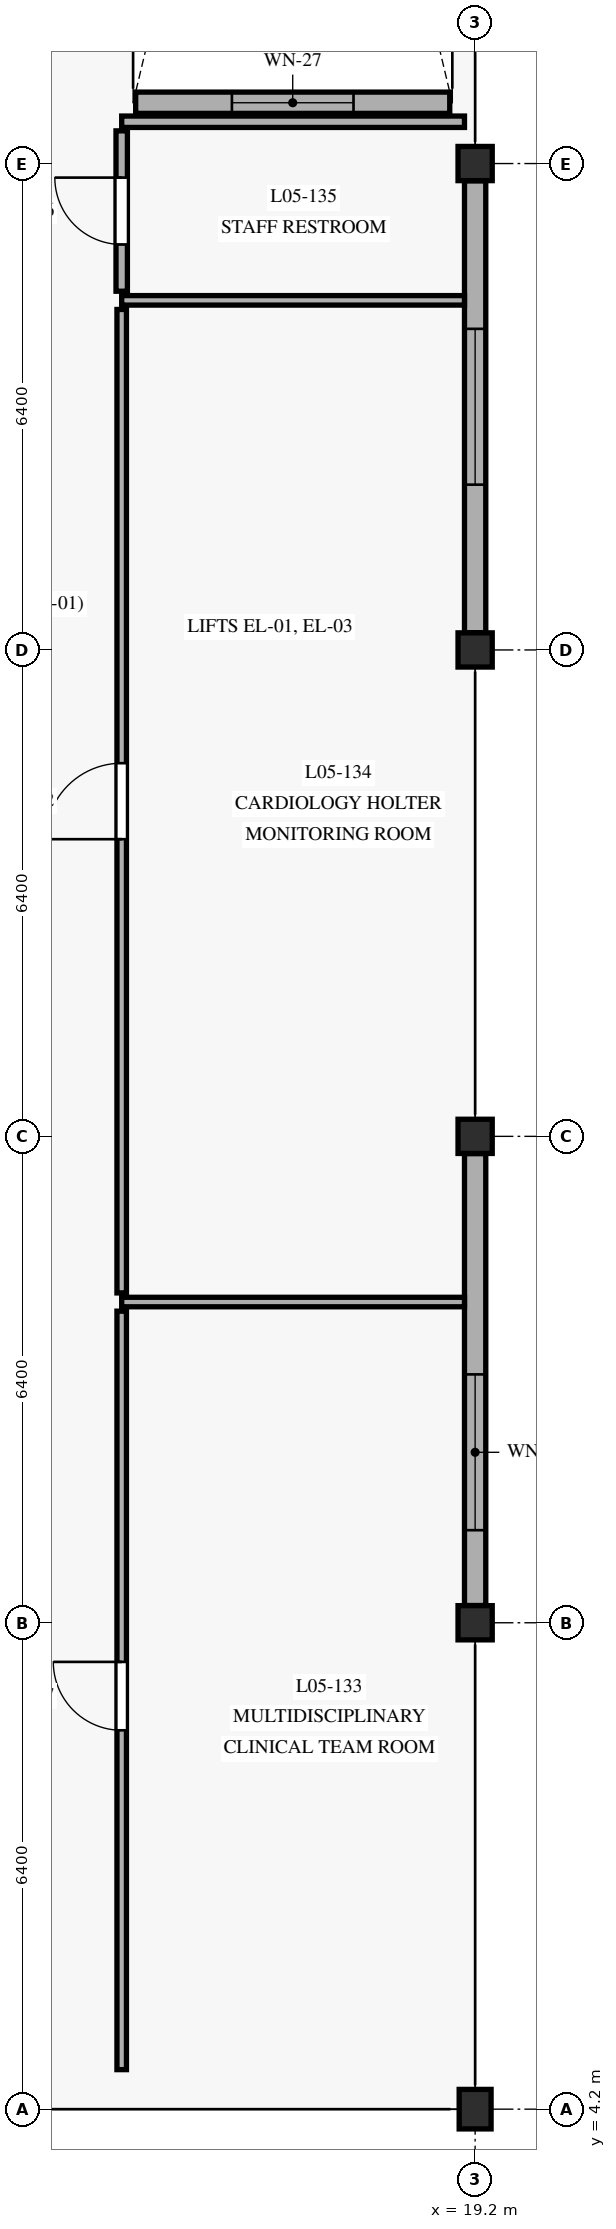
"""IFC4 building model, lengths in metres.
Left out: names, types, materials, properties, quantities, classifications, styles, units other than length and angle.
Written with IfcOpenShell. Run it as: python <this file> out.ifc"""

import sys

from ifc_helpers import new_model, si_unit, direction, frame, frame_2d, origin, origin_with_axes, origin_2d, place, context, subcontext, project, spatial, rectangle, extrude, element, fill, save


model = new_model("IFC4")
c1 = context("Model", 3, precision=1e-05, world=origin(), true_north=direction((0.0, 1.0)))
c2 = subcontext(c1, "Body", "Model", "MODEL_VIEW")
j1 = project(units=[si_unit("LENGTHUNIT", "METRE"), si_unit("PLANEANGLEUNIT", "RADIAN")], contexts=[c1])
p1 = place(None, origin())
s1 = spatial("IfcSite", under=j1, at=p1, CompositionType="ELEMENT")
p2 = place(p1, origin())
s2 = spatial("IfcBuilding", under=s1, at=p2, CompositionType="ELEMENT")
p3 = place(p2, frame((0.0, 0.0, 17.55)))
s3 = spatial("IfcBuildingStorey", under=s2, at=p3, CompositionType="ELEMENT", Elevation=17.55)
p4 = place(p3, frame((19.2, 4.2, 0.0), z_axis=(0.0, 0.0, 1.0), x_axis=(1.0, 0.0, 0.0)))
e1 = element("IfcColumn", 1, at=p4, inside=s3, PredefinedType="COLUMN", context=c2, shape_type="SweptSolid", body=[
    extrude(rectangle(XDim=0.42, YDim=0.52, at=origin_2d()), origin(), (0.0, 0.0, 1.0), 4.05),
])
for number, where, z_axis, x_axis in (
    (2, (19.2, 10.6, 0.0), (0.0, 0.0, 1.0), (1.0, 0.0, 0.0)),
    (3, (19.2, 17.0, 0.0), (0.0, 0.0, 1.0), (1.0, 0.0, 0.0)),
    (4, (19.2, 23.4, 0.0), (0.0, 0.0, 1.0), (1.0, 0.0, 0.0)),
    (5, (19.2, 29.8, 0.0), (0.0, 0.0, 1.0), (1.0, 0.0, 0.0)),
):
    element("IfcColumn", number, at=place(p3, frame(where, z_axis=z_axis, x_axis=x_axis)), inside=s3, PredefinedType="COLUMN", context=c2, shape_type="SweptSolid", body=[
        extrude(rectangle(XDim=0.45, YDim=0.45, at=origin_2d()), origin(), (0.0, 0.0, 1.0), 4.05),
    ])
p5 = place(p3, frame((19.2, 10.827, 0.0), z_axis=(0.0, 0.0, 1.0), x_axis=(0.0, 1.0, 0.0)))
e6 = element("IfcWall", 6, at=p5, inside=s3, PredefinedType="SOLIDWALL", context=c2, shape_type="SweptSolid", body=[
    extrude(rectangle(XDim=5.946, YDim=0.28, at=frame_2d((2.973, 0.0))), origin(), (0.0, 0.0, 1.0), 3.39),
])
p6 = place(p5, frame((0.991, 0.0, 0.8)))
e7 = element("IfcOpeningElement", 7, at=p6, cuts=e6, PredefinedType="OPENING", context=c2, shape_type="SweptSolid", body=[
    extrude(rectangle(XDim=2.05, YDim=1.95, at=frame_2d((1.025, 0.975))), frame((0.0, 0.15, 0.0), z_axis=(0.0, -1.0, 0.0), x_axis=(1.0, 0.0, 0.0)), (0.0, 0.0, 1.0), 0.3),
])
p7 = place(p3, frame((19.2, 23.627, 0.0), z_axis=(0.0, 0.0, 1.0), x_axis=(0.0, 1.0, 0.0)))
e8 = element("IfcWall", 8, at=p7, inside=s3, PredefinedType="SOLIDWALL", context=c2, shape_type="SweptSolid", body=[
    extrude(rectangle(XDim=5.946, YDim=0.28, at=frame_2d((2.973, 0.0))), origin(), (0.0, 0.0, 1.0), 3.39),
])
p8 = place(p7, frame((1.948, 0.0, 0.8)))
e9 = element("IfcOpeningElement", 9, at=p8, cuts=e8, PredefinedType="OPENING", context=c2, shape_type="SweptSolid", body=[
    extrude(rectangle(XDim=2.05, YDim=1.95, at=frame_2d((1.025, 0.975))), frame((0.0, 0.15, 0.0), z_axis=(0.0, -1.0, 0.0), x_axis=(1.0, 0.0, 0.0)), (0.0, 0.0, 1.0), 0.3),
])
p9 = place(p3, frame((18.866, 30.6, 0.0), z_axis=(0.0, 0.0, 1.0), x_axis=(-1.0, 0.0, 0.0)))
e10 = element("IfcWall", 10, at=p9, inside=s3, PredefinedType="SOLIDWALL", context=c2, shape_type="SweptSolid", body=[
    extrude(rectangle(XDim=4.132, YDim=0.28, at=frame_2d((2.066, 0.0))), origin(), (0.0, 0.0, 1.0), 3.77),
])
p10 = place(p9, frame((1.266, 0.0, 0.85)))
e11 = element("IfcOpeningElement", 11, at=p10, cuts=e10, PredefinedType="OPENING", context=c2, shape_type="SweptSolid", body=[
    extrude(rectangle(XDim=1.6, YDim=1.8, at=frame_2d((0.8, 0.9))), frame((0.0, 0.15, 0.0), z_axis=(0.0, -1.0, 0.0), x_axis=(1.0, 0.0, 0.0)), (0.0, 0.0, 1.0), 0.3),
])
p11 = place(p3, frame((14.55, 4.72, 0.0), z_axis=(0.0, 0.0, 1.0), x_axis=(0.0, 1.0, 0.0)))
e12 = element("IfcWall", 12, at=p11, inside=s3, PredefinedType="PARTITIONING", context=c2, shape_type="SweptSolid", body=[
    extrude(rectangle(XDim=9.98, YDim=0.125, at=frame_2d((4.99, 0.0))), origin(), (0.0, 0.0, 1.0), 3.365),
])
p12 = place(p11, frame((4.465, 0.0, 0.0)))
e13 = element("IfcOpeningElement", 13, at=p12, cuts=e12, PredefinedType="OPENING", context=c2, shape_type="SweptSolid", body=[
    extrude(rectangle(XDim=0.9, YDim=2.12, at=frame_2d((0.45, 1.06))), frame((0.0, 0.073, 0.0), z_axis=(0.0, -1.0, 0.0), x_axis=(1.0, 0.0, 0.0)), (0.0, 0.0, 1.0), 0.145),
])
p13 = place(p3, frame((14.55, 14.82, 0.0), z_axis=(0.0, 0.0, 1.0), x_axis=(1.0, 0.0, 0.0)))
e14 = element("IfcWall", 14, at=p13, inside=s3, PredefinedType="PARTITIONING", context=c2, shape_type="SweptSolid", body=[
    extrude(rectangle(XDim=4.51, YDim=0.125, at=frame_2d((2.255, 0.0))), origin(), (0.0, 0.0, 1.0), 3.385),
])
p14 = place(p3, frame((14.55, 14.94, 0.0), z_axis=(0.0, 0.0, 1.0), x_axis=(0.0, 1.0, 0.0)))
e15 = element("IfcWall", 15, at=p14, inside=s3, PredefinedType="PARTITIONING", context=c2, shape_type="SweptSolid", body=[
    extrude(rectangle(XDim=12.94, YDim=0.125, at=frame_2d((6.47, 0.0))), origin(), (0.0, 0.0, 1.0), 3.365),
])
p15 = place(p14, frame((5.97, 0.0, 0.0)))
e16 = element("IfcOpeningElement", 16, at=p15, cuts=e15, PredefinedType="OPENING", context=c2, shape_type="SweptSolid", body=[
    extrude(rectangle(XDim=1.0, YDim=2.15, at=frame_2d((0.5, 1.075))), frame((0.0, 0.073, 0.0), z_axis=(0.0, -1.0, 0.0), x_axis=(1.0, 0.0, 0.0)), (0.0, 0.0, 1.0), 0.145),
])
p16 = place(p3, frame((14.55, 28.0, 0.0), z_axis=(0.0, 0.0, 1.0), x_axis=(1.0, 0.0, 0.0)))
e17 = element("IfcWall", 17, at=p16, inside=s3, PredefinedType="PARTITIONING", context=c2, shape_type="SweptSolid", body=[
    extrude(rectangle(XDim=4.51, YDim=0.125, at=frame_2d((2.255, 0.0))), origin(), (0.0, 0.0, 1.0), 3.385),
])
p17 = place(p3, frame((14.55, 28.12, 0.0), z_axis=(0.0, 0.0, 1.0), x_axis=(0.0, 1.0, 0.0)))
e18 = element("IfcWall", 18, at=p17, inside=s3, PredefinedType="PARTITIONING", context=c2, shape_type="SweptSolid", body=[
    extrude(rectangle(XDim=2.11, YDim=0.15, at=frame_2d((1.055, 0.0))), origin(), (0.0, 0.0, 1.0), 3.365),
])
p18 = place(p17, frame((0.615, 0.0, 0.0)))
e19 = element("IfcOpeningElement", 19, at=p18, cuts=e18, PredefinedType="OPENING", context=c2, shape_type="SweptSolid", body=[
    extrude(rectangle(XDim=0.88, YDim=2.1, at=frame_2d((0.44, 1.05))), frame((0.0, 0.085, 0.0), z_axis=(0.0, -1.0, 0.0), x_axis=(1.0, 0.0, 0.0)), (0.0, 0.0, 1.0), 0.17),
])
p19 = place(p3, frame((14.55, 30.35, 0.0), z_axis=(0.0, 0.0, 1.0), x_axis=(1.0, 0.0, 0.0)))
e20 = element("IfcWall", 20, at=p19, inside=s3, PredefinedType="PARTITIONING", context=c2, shape_type="SweptSolid", body=[
    extrude(rectangle(XDim=4.51, YDim=0.15, at=frame_2d((2.255, 0.0))), origin(), (0.0, 0.0, 1.0), 3.385),
])
p20 = place(p6, origin_with_axes())
e21 = element("IfcWindow", 21, at=p20, inside=s3, PartitioningType="SINGLE_PANEL", PredefinedType="WINDOW", context=c2, shape_type="SweptSolid", body=[
    extrude(rectangle(XDim=2.05, YDim=1.95, at=frame_2d((1.025, 0.975))), frame((0.0, 0.03, 0.0), z_axis=(0.0, -1.0, 0.0), x_axis=(1.0, 0.0, 0.0)), (0.0, 0.0, 1.0), 0.06),
])
fill(e7, e21)
p21 = place(p8, origin_with_axes())
e22 = element("IfcWindow", 22, at=p21, inside=s3, PartitioningType="SINGLE_PANEL", PredefinedType="WINDOW", context=c2, shape_type="SweptSolid", body=[
    extrude(rectangle(XDim=2.05, YDim=1.95, at=frame_2d((1.025, 0.975))), frame((0.0, 0.03, 0.0), z_axis=(0.0, -1.0, 0.0), x_axis=(1.0, 0.0, 0.0)), (0.0, 0.0, 1.0), 0.06),
])
fill(e9, e22)
p22 = place(p10, origin_with_axes())
e23 = element("IfcWindow", 23, at=p22, inside=s3, PartitioningType="SINGLE_PANEL", PredefinedType="WINDOW", context=c2, shape_type="SweptSolid", body=[
    extrude(rectangle(XDim=1.6, YDim=1.8, at=frame_2d((0.8, 0.9))), frame((0.0, 0.03, 0.0), z_axis=(0.0, -1.0, 0.0), x_axis=(1.0, 0.0, 0.0)), (0.0, 0.0, 1.0), 0.06),
])
fill(e11, e23)
p23 = place(p12, frame((0.9, 0.0, 0.0), z_axis=(0.0, 0.0, 1.0), x_axis=(-1.0, 0.0, 0.0)))
e24 = element("IfcDoor", 24, at=p23, inside=s3, OperationType="SINGLE_SWING_LEFT", PredefinedType="DOOR", context=c2, shape_type="SweptSolid", body=[
    extrude(rectangle(XDim=0.9, YDim=2.12, at=frame_2d((0.45, 1.06))), frame((0.0, 0.025, 0.0), z_axis=(0.0, -1.0, 0.0), x_axis=(1.0, 0.0, 0.0)), (0.0, 0.0, 1.0), 0.05),
])
fill(e13, e24)
p24 = place(p15, frame((1.0, 0.0, 0.0), z_axis=(0.0, 0.0, 1.0), x_axis=(-1.0, 0.0, 0.0)))
e25 = element("IfcDoor", 25, at=p24, inside=s3, OperationType="SINGLE_SWING_RIGHT", PredefinedType="DOOR", context=c2, shape_type="SweptSolid", body=[
    extrude(rectangle(XDim=1.0, YDim=2.15, at=frame_2d((0.5, 1.075))), frame((0.0, 0.025, 0.0), z_axis=(0.0, -1.0, 0.0), x_axis=(1.0, 0.0, 0.0)), (0.0, 0.0, 1.0), 0.05),
])
fill(e16, e25)
p25 = place(p18, frame((0.88, 0.0, 0.0), z_axis=(0.0, 0.0, 1.0), x_axis=(-1.0, 0.0, 0.0)))
e26 = element("IfcDoor", 26, at=p25, inside=s3, OperationType="SINGLE_SWING_LEFT", PredefinedType="DOOR", context=c2, shape_type="SweptSolid", body=[
    extrude(rectangle(XDim=0.88, YDim=2.1, at=frame_2d((0.44, 1.05))), frame((0.0, 0.025, 0.0), z_axis=(0.0, -1.0, 0.0), x_axis=(1.0, 0.0, 0.0)), (0.0, 0.0, 1.0), 0.05),
])
fill(e19, e26)
save(model, sys.argv[1])
